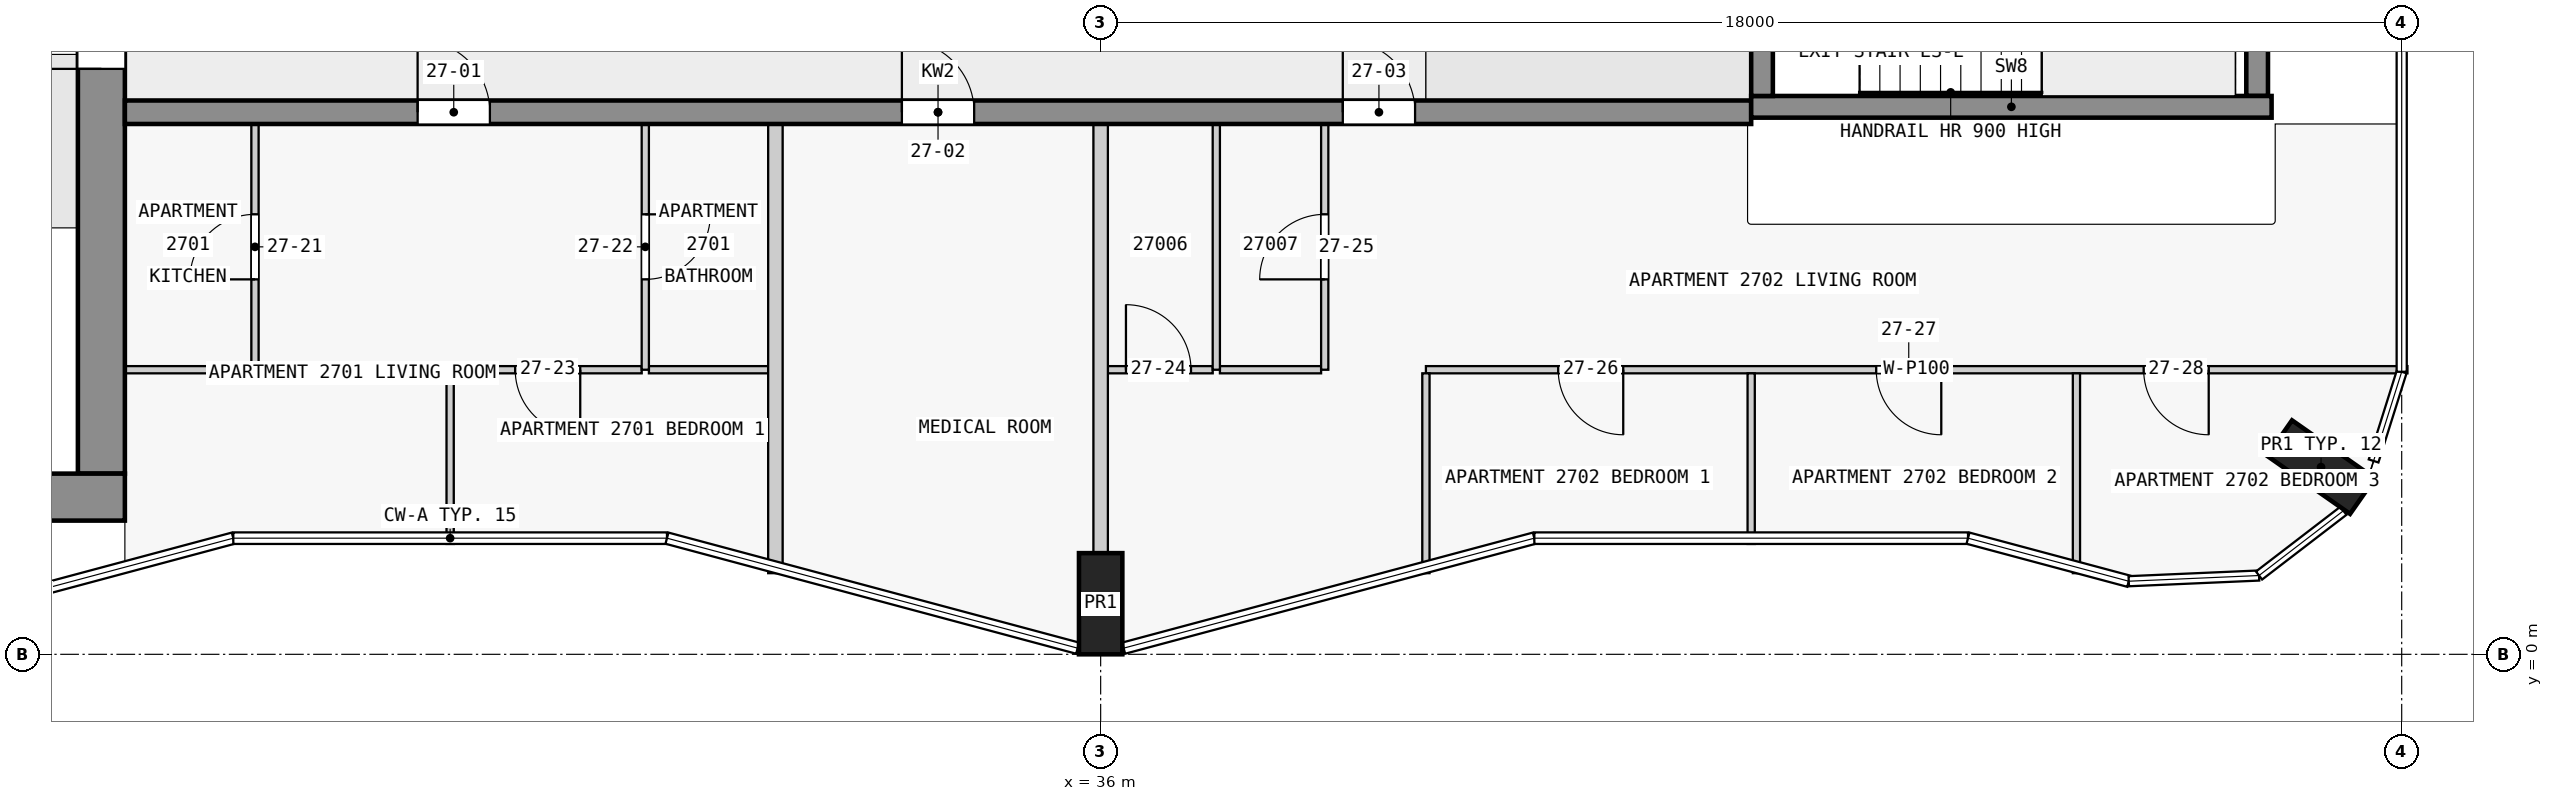
"""IFC4 building model, lengths in metres.
Left out: names, types, materials, properties, quantities, classifications, styles, units other than length and angle.
Written with IfcOpenShell. Run it as: python <this file> out.ifc"""

import sys

from ifc_helpers import new_model, si_unit, direction, frame, frame_2d, origin, origin_2d, place, context, subcontext, project, spatial, rectangle, extrude, element, fill, save


model = new_model("IFC4")
c1 = context("Model", 3, precision=1e-05, world=origin(), true_north=direction((0.0, 1.0)))
c2 = subcontext(c1, "Body", "Model", "MODEL_VIEW")
j1 = project(units=[si_unit("LENGTHUNIT", "METRE"), si_unit("PLANEANGLEUNIT", "RADIAN")], contexts=[c1])
p1 = place(None, origin())
s1 = spatial("IfcSite", under=j1, at=p1, CompositionType="ELEMENT")
p2 = place(p1, origin())
s2 = spatial("IfcBuilding", under=s1, at=p2, CompositionType="ELEMENT")
p3 = place(p2, frame((0.0, 0.0, 106.3)))
s3 = spatial("IfcBuildingStorey", under=s2, at=p3, CompositionType="ELEMENT", Elevation=106.3)
for number, where, z_axis, x_axis in (
    (1, (36.0, 0.7, 0.0), (0.0, 0.0, 1.0), (1.0, 0.0, 0.0)),
    (2, (52.884, 2.59, 0.0), (0.0, 0.0, 1.0), (0.574, 0.819, 0.0)),
):
    element("IfcColumn", number, at=place(p3, frame(where, z_axis=z_axis, x_axis=x_axis)), inside=s3, PredefinedType="COLUMN", context=c2, shape_type="SweptSolid", body=[
        extrude(rectangle(XDim=0.6, YDim=1.4, at=origin_2d()), origin(), (0.0, 0.0, 1.0), 3.5),
    ])
p4 = place(p3, frame((1.65, 2.175, 0.0), z_axis=(0.0, 0.0, 1.0), x_axis=(1.0, 0.0, 0.0)))
e3 = element("IfcWall", 3, at=p4, inside=s3, PredefinedType="SHEAR", context=c2, shape_type="SweptSolid", body=[
    extrude(rectangle(XDim=20.85, YDim=0.65, at=frame_2d((10.425, 0.0))), origin(), (0.0, 0.0, 1.0), 3.25),
])
p5 = place(p3, frame((22.175, 2.5, 0.0), z_axis=(0.0, 0.0, 1.0), x_axis=(0.0, 1.0, 0.0)))
e4 = element("IfcWall", 4, at=p5, inside=s3, PredefinedType="SHEAR", context=c2, shape_type="SweptSolid", body=[
    extrude(rectangle(XDim=14.85, YDim=0.65, at=frame_2d((7.425, 0.0))), origin(), (0.0, 0.0, 1.0), 3.25),
])
p6 = place(p5, frame((5.6, 0.0, 0.0)))
e5 = element("IfcOpeningElement", 5, at=p6, cuts=e4, PredefinedType="OPENING", context=c2, shape_type="SweptSolid", body=[
    extrude(rectangle(XDim=1.8, YDim=2.1, at=frame_2d((0.9, 1.05))), frame((0.0, 0.335, 0.0), z_axis=(0.0, -1.0, 0.0), x_axis=(1.0, 0.0, 0.0)), (0.0, 0.0, 1.0), 0.67),
])
p7 = place(p3, frame((45.15, 7.725, 0.0), z_axis=(0.0, 0.0, 1.0), x_axis=(0.0, 1.0, 0.0)))
e6 = element("IfcWall", 6, at=p7, inside=s3, PredefinedType="SHEAR", context=c2, shape_type="SweptSolid", body=[
    extrude(rectangle(XDim=2.55, YDim=0.3, at=frame_2d((1.275, 0.0))), origin(), (0.0, 0.0, 1.0), 3.5),
])
p8 = place(p7, frame((0.725, 0.0, 0.0)))
e7 = element("IfcOpeningElement", 7, at=p8, cuts=e6, PredefinedType="OPENING", context=c2, shape_type="SweptSolid", body=[
    extrude(rectangle(XDim=1.1, YDim=2.1, at=frame_2d((0.55, 1.05))), frame((0.0, 0.16, 0.0), z_axis=(0.0, -1.0, 0.0), x_axis=(1.0, 0.0, 0.0)), (0.0, 0.0, 1.0), 0.32),
])
p9 = place(p3, frame((52.0, 7.725, 0.0), z_axis=(0.0, 0.0, 1.0), x_axis=(0.0, 1.0, 0.0)))
e8 = element("IfcWall", 8, at=p9, inside=s3, PredefinedType="SHEAR", context=c2, shape_type="SweptSolid", body=[
    extrude(rectangle(XDim=2.55, YDim=0.3, at=frame_2d((1.275, 0.0))), origin(), (0.0, 0.0, 1.0), 3.5),
])
p10 = place(p3, frame((45.0, 7.575, 0.0), z_axis=(0.0, 0.0, 1.0), x_axis=(1.0, 0.0, 0.0)))
e9 = element("IfcWall", 9, at=p10, inside=s3, PredefinedType="SHEAR", context=c2, shape_type="SweptSolid", body=[
    extrude(rectangle(XDim=7.2, YDim=0.3, at=frame_2d((3.6, 0.0))), origin(), (0.0, 0.0, 1.0), 3.5),
])
p11 = place(p3, frame((22.5, 7.5, 0.0), z_axis=(0.0, 0.0, 1.0), x_axis=(1.0, 0.0, 0.0)))
e10 = element("IfcWall", 10, at=p11, inside=s3, PredefinedType="SHEAR", context=c2, shape_type="SweptSolid", body=[
    extrude(rectangle(XDim=22.5, YDim=0.325, at=frame_2d((11.25, 0.0))), origin(), (0.0, 0.0, 1.0), 3.25),
])
p12 = place(p11, frame((4.05, 0.0, 0.0)))
e11 = element("IfcOpeningElement", 11, at=p12, cuts=e10, PredefinedType="OPENING", context=c2, shape_type="SweptSolid", body=[
    extrude(rectangle(XDim=1.0, YDim=2.1, at=frame_2d((0.5, 1.05))), frame((0.0, 0.172, 0.0), z_axis=(0.0, -1.0, 0.0), x_axis=(1.0, 0.0, 0.0)), (0.0, 0.0, 1.0), 0.345),
])
p13 = place(p11, frame((10.75, 0.0, 0.0)))
e12 = element("IfcOpeningElement", 12, at=p13, cuts=e10, PredefinedType="OPENING", context=c2, shape_type="SweptSolid", body=[
    extrude(rectangle(XDim=1.0, YDim=2.1, at=frame_2d((0.5, 1.05))), frame((0.0, 0.172, 0.0), z_axis=(0.0, -1.0, 0.0), x_axis=(1.0, 0.0, 0.0)), (0.0, 0.0, 1.0), 0.345),
])
p14 = place(p11, frame((16.85, 0.0, 0.0)))
e13 = element("IfcOpeningElement", 13, at=p14, cuts=e10, PredefinedType="OPENING", context=c2, shape_type="SweptSolid", body=[
    extrude(rectangle(XDim=1.0, YDim=2.1, at=frame_2d((0.5, 1.05))), frame((0.0, 0.172, 0.0), z_axis=(0.0, -1.0, 0.0), x_axis=(1.0, 0.0, 0.0)), (0.0, 0.0, 1.0), 0.345),
])
p15 = place(p3, frame((29.65, 3.938, 0.0), z_axis=(0.0, 0.0, 1.0), x_axis=(-1.0, 0.0, 0.0)))
e14 = element("IfcWall", 14, at=p15, inside=s3, PredefinedType="PARTITIONING", context=c2, shape_type="SweptSolid", body=[
    extrude(rectangle(XDim=2.65, YDim=0.1, at=frame_2d((1.325, 0.0))), origin(), (0.0, 0.0, 1.0), 3.25),
])
p16 = place(p15, frame((0.85, 0.0, 0.0)))
e15 = element("IfcOpeningElement", 15, at=p16, cuts=e14, PredefinedType="OPENING", context=c2, shape_type="SweptSolid", body=[
    extrude(rectangle(XDim=0.9, YDim=2.1, at=frame_2d((0.45, 1.05))), frame((0.0, 0.06, 0.0), z_axis=(0.0, -1.0, 0.0), x_axis=(1.0, 0.0, 0.0)), (0.0, 0.0, 1.0), 0.12),
])
p17 = place(p3, frame((54.08, 3.938, 0.0), z_axis=(0.0, 0.0, 1.0), x_axis=(-1.0, 0.0, 0.0)))
e16 = element("IfcWall", 16, at=p17, inside=s3, PredefinedType="PARTITIONING", context=c2, shape_type="SweptSolid", body=[
    extrude(rectangle(XDim=13.58, YDim=0.1, at=frame_2d((6.79, 0.0))), origin(), (0.0, 0.0, 1.0), 3.25),
])
p18 = place(p17, frame((10.85, 0.0, 0.0)))
e17 = element("IfcOpeningElement", 17, at=p18, cuts=e16, PredefinedType="OPENING", context=c2, shape_type="SweptSolid", body=[
    extrude(rectangle(XDim=0.9, YDim=2.1, at=frame_2d((0.45, 1.05))), frame((0.0, 0.06, 0.0), z_axis=(0.0, -1.0, 0.0), x_axis=(1.0, 0.0, 0.0)), (0.0, 0.0, 1.0), 0.12),
])
p19 = place(p17, frame((6.45, 0.0, 0.0)))
e18 = element("IfcOpeningElement", 18, at=p19, cuts=e16, PredefinedType="OPENING", context=c2, shape_type="SweptSolid", body=[
    extrude(rectangle(XDim=0.9, YDim=2.1, at=frame_2d((0.45, 1.05))), frame((0.0, 0.06, 0.0), z_axis=(0.0, -1.0, 0.0), x_axis=(1.0, 0.0, 0.0)), (0.0, 0.0, 1.0), 0.12),
])
p20 = place(p17, frame((2.75, 0.0, 0.0)))
e19 = element("IfcOpeningElement", 19, at=p20, cuts=e16, PredefinedType="OPENING", context=c2, shape_type="SweptSolid", body=[
    extrude(rectangle(XDim=0.9, YDim=2.1, at=frame_2d((0.45, 1.05))), frame((0.0, 0.06, 0.0), z_axis=(0.0, -1.0, 0.0), x_axis=(1.0, 0.0, 0.0)), (0.0, 0.0, 1.0), 0.12),
])
p21 = place(p3, frame((22.5, 3.938, 0.0), z_axis=(0.0, 0.0, 1.0), x_axis=(1.0, 0.0, 0.0)))
e20 = element("IfcWall", 20, at=p21, inside=s3, PredefinedType="PARTITIONING", context=c2, shape_type="SweptSolid", body=[
    extrude(rectangle(XDim=1.75, YDim=0.1, at=frame_2d((0.875, 0.0))), origin(), (0.0, 0.0, 1.0), 3.25),
])
p22 = place(p3, frame((29.75, 3.938, 0.0), z_axis=(0.0, 0.0, 1.0), x_axis=(1.0, 0.0, 0.0)))
e21 = element("IfcWall", 21, at=p22, inside=s3, PredefinedType="PARTITIONING", context=c2, shape_type="SweptSolid", body=[
    extrude(rectangle(XDim=1.65, YDim=0.1, at=frame_2d((0.825, 0.0))), origin(), (0.0, 0.0, 1.0), 3.25),
])
p23 = place(p3, frame((36.1, 3.938, 0.0), z_axis=(0.0, 0.0, 1.0), x_axis=(1.0, 0.0, 0.0)))
e22 = element("IfcWall", 22, at=p23, inside=s3, PredefinedType="PARTITIONING", context=c2, shape_type="SweptSolid", body=[
    extrude(rectangle(XDim=1.45, YDim=0.1, at=frame_2d((0.725, 0.0))), origin(), (0.0, 0.0, 1.0), 3.25),
])
p24 = place(p23, frame((0.25, 0.0, 0.0)))
e23 = element("IfcOpeningElement", 23, at=p24, cuts=e22, PredefinedType="OPENING", context=c2, shape_type="SweptSolid", body=[
    extrude(rectangle(XDim=0.9, YDim=2.1, at=frame_2d((0.45, 1.05))), frame((0.0, 0.06, 0.0), z_axis=(0.0, -1.0, 0.0), x_axis=(1.0, 0.0, 0.0)), (0.0, 0.0, 1.0), 0.12),
])
p25 = place(p3, frame((37.65, 3.938, 0.0), z_axis=(0.0, 0.0, 1.0), x_axis=(1.0, 0.0, 0.0)))
e24 = element("IfcWall", 24, at=p25, inside=s3, PredefinedType="PARTITIONING", context=c2, shape_type="SweptSolid", body=[
    extrude(rectangle(XDim=1.4, YDim=0.1, at=frame_2d((0.7, 0.0))), origin(), (0.0, 0.0, 1.0), 3.25),
])
p26 = place(p3, frame((24.3, 3.938, 0.0), z_axis=(0.0, 0.0, 1.0), x_axis=(0.0, 1.0, 0.0)))
e25 = element("IfcWall", 25, at=p26, inside=s3, PredefinedType="PARTITIONING", context=c2, shape_type="SweptSolid", body=[
    extrude(rectangle(XDim=3.4, YDim=0.1, at=frame_2d((1.7, 0.0))), origin(), (0.0, 0.0, 1.0), 3.25),
])
p27 = place(p26, frame((1.25, 0.0, 0.0)))
e26 = element("IfcOpeningElement", 26, at=p27, cuts=e25, PredefinedType="OPENING", context=c2, shape_type="SweptSolid", body=[
    extrude(rectangle(XDim=0.9, YDim=2.1, at=frame_2d((0.45, 1.05))), frame((0.0, 0.06, 0.0), z_axis=(0.0, -1.0, 0.0), x_axis=(1.0, 0.0, 0.0)), (0.0, 0.0, 1.0), 0.12),
])
p28 = place(p3, frame((27.0, 3.887, 0.0), z_axis=(0.0, 0.0, 1.0), x_axis=(0.0, -1.0, 0.0)))
e27 = element("IfcWall", 27, at=p28, inside=s3, PredefinedType="PARTITIONING", context=c2, shape_type="SweptSolid", body=[
    extrude(rectangle(XDim=2.361, YDim=0.1, at=frame_2d((1.18, 0.0))), origin(), (0.0, 0.0, 1.0), 3.25),
])
p29 = place(p3, frame((29.7, 7.337, 0.0), z_axis=(0.0, 0.0, 1.0), x_axis=(0.0, -1.0, 0.0)))
e28 = element("IfcWall", 28, at=p29, inside=s3, PredefinedType="PARTITIONING", context=c2, shape_type="SweptSolid", body=[
    extrude(rectangle(XDim=3.4, YDim=0.1, at=frame_2d((1.7, 0.0))), origin(), (0.0, 0.0, 1.0), 3.25),
])
p30 = place(p29, frame((1.25, 0.0, 0.0)))
e29 = element("IfcOpeningElement", 29, at=p30, cuts=e28, PredefinedType="OPENING", context=c2, shape_type="SweptSolid", body=[
    extrude(rectangle(XDim=0.9, YDim=2.1, at=frame_2d((0.45, 1.05))), frame((0.0, 0.06, 0.0), z_axis=(0.0, -1.0, 0.0), x_axis=(1.0, 0.0, 0.0)), (0.0, 0.0, 1.0), 0.12),
])
p31 = place(p3, frame((31.5, 1.122, 0.0), z_axis=(0.0, 0.0, 1.0), x_axis=(0.0, 1.0, 0.0)))
e30 = element("IfcWall", 30, at=p31, inside=s3, PredefinedType="PARTITIONING", context=c2, shape_type="SweptSolid", body=[
    extrude(rectangle(XDim=6.215, YDim=0.2, at=frame_2d((3.107, 0.0))), origin(), (0.0, 0.0, 1.0), 3.25),
])
p32 = place(p3, frame((36.0, 1.4, 0.0), z_axis=(0.0, 0.0, 1.0), x_axis=(0.0, 1.0, 0.0)))
e31 = element("IfcWall", 31, at=p32, inside=s3, PredefinedType="PARTITIONING", context=c2, shape_type="SweptSolid", body=[
    extrude(rectangle(XDim=5.938, YDim=0.2, at=frame_2d((2.969, 0.0))), origin(), (0.0, 0.0, 1.0), 3.25),
])
p33 = place(p3, frame((37.6, 3.938, 0.0), z_axis=(0.0, 0.0, 1.0), x_axis=(0.0, 1.0, 0.0)))
e32 = element("IfcWall", 32, at=p33, inside=s3, PredefinedType="PARTITIONING", context=c2, shape_type="SweptSolid", body=[
    extrude(rectangle(XDim=3.4, YDim=0.1, at=frame_2d((1.7, 0.0))), origin(), (0.0, 0.0, 1.0), 3.25),
])
p34 = place(p3, frame((39.1, 3.938, 0.0), z_axis=(0.0, 0.0, 1.0), x_axis=(0.0, 1.0, 0.0)))
e33 = element("IfcWall", 33, at=p34, inside=s3, PredefinedType="PARTITIONING", context=c2, shape_type="SweptSolid", body=[
    extrude(rectangle(XDim=3.4, YDim=0.1, at=frame_2d((1.7, 0.0))), origin(), (0.0, 0.0, 1.0), 3.25),
])
p35 = place(p34, frame((1.25, 0.0, 0.0)))
e34 = element("IfcOpeningElement", 34, at=p35, cuts=e33, PredefinedType="OPENING", context=c2, shape_type="SweptSolid", body=[
    extrude(rectangle(XDim=0.9, YDim=2.1, at=frame_2d((0.45, 1.05))), frame((0.0, 0.06, 0.0), z_axis=(0.0, -1.0, 0.0), x_axis=(1.0, 0.0, 0.0)), (0.0, 0.0, 1.0), 0.12),
])
p36 = place(p3, frame((40.5, 3.887, 0.0), z_axis=(0.0, 0.0, 1.0), x_axis=(0.0, -1.0, 0.0)))
e35 = element("IfcWall", 35, at=p36, inside=s3, PredefinedType="PARTITIONING", context=c2, shape_type="SweptSolid", body=[
    extrude(rectangle(XDim=2.765, YDim=0.1, at=frame_2d((1.383, 0.0))), origin(), (0.0, 0.0, 1.0), 3.25),
])
p37 = place(p3, frame((45.0, 1.527, 0.0), z_axis=(0.0, 0.0, 1.0), x_axis=(0.0, 1.0, 0.0)))
e36 = element("IfcWall", 36, at=p37, inside=s3, PredefinedType="PARTITIONING", context=c2, shape_type="SweptSolid", body=[
    extrude(rectangle(XDim=2.361, YDim=0.1, at=frame_2d((1.18, 0.0))), origin(), (0.0, 0.0, 1.0), 3.25),
])
p38 = place(p3, frame((49.5, 1.122, 0.0), z_axis=(0.0, 0.0, 1.0), x_axis=(0.0, 1.0, 0.0)))
e37 = element("IfcWall", 37, at=p38, inside=s3, PredefinedType="PARTITIONING", context=c2, shape_type="SweptSolid", body=[
    extrude(rectangle(XDim=2.765, YDim=0.1, at=frame_2d((1.383, 0.0))), origin(), (0.0, 0.0, 1.0), 3.25),
])
p39 = place(p6, origin())
e38 = element("IfcDoor", 38, at=p39, inside=s3, OperationType="DOUBLE_DOOR_SINGLE_SWING", PredefinedType="DOOR", context=c2, shape_type="SweptSolid", body=[
    extrude(rectangle(XDim=1.8, YDim=2.1, at=frame_2d((0.9, 1.05))), frame((0.0, 0.025, 0.0), z_axis=(0.0, -1.0, 0.0), x_axis=(1.0, 0.0, 0.0)), (0.0, 0.0, 1.0), 0.05),
])
fill(e5, e38)
p40 = place(p12, origin())
e39 = element("IfcDoor", 39, at=p40, inside=s3, OperationType="SINGLE_SWING_LEFT", PredefinedType="DOOR", context=c2, shape_type="SweptSolid", body=[
    extrude(rectangle(XDim=1.0, YDim=2.1, at=frame_2d((0.5, 1.05))), frame((0.0, 0.025, 0.0), z_axis=(0.0, -1.0, 0.0), x_axis=(1.0, 0.0, 0.0)), (0.0, 0.0, 1.0), 0.05),
])
fill(e11, e39)
p41 = place(p13, origin())
e40 = element("IfcDoor", 40, at=p41, inside=s3, OperationType="SINGLE_SWING_LEFT", PredefinedType="DOOR", context=c2, shape_type="SweptSolid", body=[
    extrude(rectangle(XDim=1.0, YDim=2.1, at=frame_2d((0.5, 1.05))), frame((0.0, 0.025, 0.0), z_axis=(0.0, -1.0, 0.0), x_axis=(1.0, 0.0, 0.0)), (0.0, 0.0, 1.0), 0.05),
])
fill(e12, e40)
p42 = place(p14, origin())
e41 = element("IfcDoor", 41, at=p42, inside=s3, OperationType="SINGLE_SWING_RIGHT", PredefinedType="DOOR", context=c2, shape_type="SweptSolid", body=[
    extrude(rectangle(XDim=1.0, YDim=2.1, at=frame_2d((0.5, 1.05))), frame((0.0, 0.025, 0.0), z_axis=(0.0, -1.0, 0.0), x_axis=(1.0, 0.0, 0.0)), (0.0, 0.0, 1.0), 0.05),
])
fill(e13, e41)
p43 = place(p27, origin())
e42 = element("IfcDoor", 42, at=p43, inside=s3, OperationType="SINGLE_SWING_LEFT", PredefinedType="DOOR", context=c2, shape_type="SweptSolid", body=[
    extrude(rectangle(XDim=0.9, YDim=2.1, at=frame_2d((0.45, 1.05))), frame((0.0, 0.025, 0.0), z_axis=(0.0, -1.0, 0.0), x_axis=(1.0, 0.0, 0.0)), (0.0, 0.0, 1.0), 0.05),
])
fill(e26, e42)
p44 = place(p30, origin())
e43 = element("IfcDoor", 43, at=p44, inside=s3, OperationType="SINGLE_SWING_LEFT", PredefinedType="DOOR", context=c2, shape_type="SweptSolid", body=[
    extrude(rectangle(XDim=0.9, YDim=2.1, at=frame_2d((0.45, 1.05))), frame((0.0, 0.025, 0.0), z_axis=(0.0, -1.0, 0.0), x_axis=(1.0, 0.0, 0.0)), (0.0, 0.0, 1.0), 0.05),
])
fill(e29, e43)
p45 = place(p16, origin())
e44 = element("IfcDoor", 44, at=p45, inside=s3, OperationType="SINGLE_SWING_LEFT", PredefinedType="DOOR", context=c2, shape_type="SweptSolid", body=[
    extrude(rectangle(XDim=0.9, YDim=2.1, at=frame_2d((0.45, 1.05))), frame((0.0, 0.025, 0.0), z_axis=(0.0, -1.0, 0.0), x_axis=(1.0, 0.0, 0.0)), (0.0, 0.0, 1.0), 0.05),
])
fill(e15, e44)
p46 = place(p24, origin())
e45 = element("IfcDoor", 45, at=p46, inside=s3, OperationType="SINGLE_SWING_LEFT", PredefinedType="DOOR", context=c2, shape_type="SweptSolid", body=[
    extrude(rectangle(XDim=0.9, YDim=2.1, at=frame_2d((0.45, 1.05))), frame((0.0, 0.025, 0.0), z_axis=(0.0, -1.0, 0.0), x_axis=(1.0, 0.0, 0.0)), (0.0, 0.0, 1.0), 0.05),
])
fill(e23, e45)
p47 = place(p35, origin())
e46 = element("IfcDoor", 46, at=p47, inside=s3, OperationType="SINGLE_SWING_LEFT", PredefinedType="DOOR", context=c2, shape_type="SweptSolid", body=[
    extrude(rectangle(XDim=0.9, YDim=2.1, at=frame_2d((0.45, 1.05))), frame((0.0, 0.025, 0.0), z_axis=(0.0, -1.0, 0.0), x_axis=(1.0, 0.0, 0.0)), (0.0, 0.0, 1.0), 0.05),
])
fill(e34, e46)
p48 = place(p18, origin())
e47 = element("IfcDoor", 47, at=p48, inside=s3, OperationType="SINGLE_SWING_RIGHT", PredefinedType="DOOR", context=c2, shape_type="SweptSolid", body=[
    extrude(rectangle(XDim=0.9, YDim=2.1, at=frame_2d((0.45, 1.05))), frame((0.0, 0.025, 0.0), z_axis=(0.0, -1.0, 0.0), x_axis=(1.0, 0.0, 0.0)), (0.0, 0.0, 1.0), 0.05),
])
fill(e17, e47)
p49 = place(p19, origin())
e48 = element("IfcDoor", 48, at=p49, inside=s3, OperationType="SINGLE_SWING_RIGHT", PredefinedType="DOOR", context=c2, shape_type="SweptSolid", body=[
    extrude(rectangle(XDim=0.9, YDim=2.1, at=frame_2d((0.45, 1.05))), frame((0.0, 0.025, 0.0), z_axis=(0.0, -1.0, 0.0), x_axis=(1.0, 0.0, 0.0)), (0.0, 0.0, 1.0), 0.05),
])
fill(e18, e48)
p50 = place(p20, origin())
e49 = element("IfcDoor", 49, at=p50, inside=s3, OperationType="SINGLE_SWING_LEFT", PredefinedType="DOOR", context=c2, shape_type="SweptSolid", body=[
    extrude(rectangle(XDim=0.9, YDim=2.1, at=frame_2d((0.45, 1.05))), frame((0.0, 0.025, 0.0), z_axis=(0.0, -1.0, 0.0), x_axis=(1.0, 0.0, 0.0)), (0.0, 0.0, 1.0), 0.05),
])
fill(e19, e49)
save(model, sys.argv[1])
